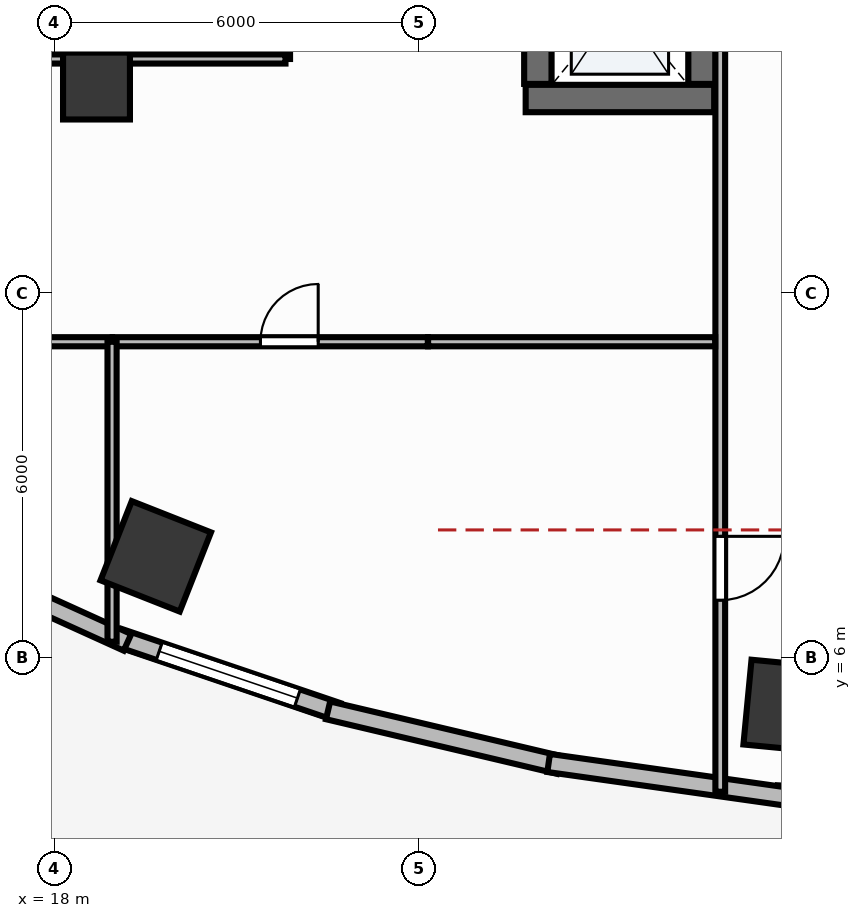
"""IFC4 building model, lengths in metres.
Left out: names, types, materials, properties, quantities, classifications, styles, units other than length and angle.
Written with IfcOpenShell. Run it as: python <this file> out.ifc"""

import sys

from ifc_helpers import new_model, si_unit, direction, frame, frame_2d, origin, origin_2d, place, context, subcontext, project, spatial, rectangle, extrude, element, fill, save


model = new_model("IFC4")
c1 = context("Model", 3, precision=1e-05, world=origin(), true_north=direction((0.0, 1.0)))
c2 = subcontext(c1, "Body", "Model", "MODEL_VIEW")
j1 = project(units=[si_unit("LENGTHUNIT", "METRE"), si_unit("PLANEANGLEUNIT", "RADIAN")], contexts=[c1])
p1 = place(None, origin())
s1 = spatial("IfcSite", under=j1, at=p1, CompositionType="ELEMENT")
p2 = place(p1, origin())
s2 = spatial("IfcBuilding", under=s1, at=p2, CompositionType="ELEMENT")
p3 = place(p2, origin())
s3 = spatial("IfcBuildingStorey", under=s2, at=p3, CompositionType="ELEMENT", Elevation=0.0)
p4 = place(p3, frame((25.75, 15.2, 0.0), z_axis=(0.0, 0.0, 1.0), x_axis=(1.0, 0.0, 0.0)))
e1 = element("IfcWall", 1, at=p4, inside=s3, PredefinedType="SHEAR", context=c2, shape_type="SweptSolid", body=[
    extrude(rectangle(XDim=3.1, YDim=0.45, at=frame_2d((1.55, 0.0))), origin(), (0.0, 0.0, 1.0), 5.1),
])
for number, where, z_axis, x_axis in (
    (2, (25.95, 15.44, 0.0), (0.0, 0.0, 1.0), (0.0, 1.0, 0.0)),
    (3, (28.65, 15.44, 0.0), (0.0, 0.0, 1.0), (0.0, 1.0, 0.0)),
):
    element("IfcWall", number, at=place(p3, frame(where, z_axis=z_axis, x_axis=x_axis)), inside=s3, PredefinedType="SHEAR", context=c2, shape_type="SweptSolid", body=[
        extrude(rectangle(XDim=2.7, YDim=0.45, at=frame_2d((1.35, 0.0))), origin(), (0.0, 0.0, 1.0), 5.1),
    ])
p5 = place(p3, frame((18.692, 15.405, -0.0), z_axis=(0.0, 0.0, 1.0), x_axis=(1.0, 0.0, 0.0)))
e4 = element("IfcColumn", 4, at=p5, inside=s3, PredefinedType="COLUMN", context=c2, shape_type="SweptSolid", body=[
    extrude(rectangle(XDim=1.1, YDim=1.1, at=origin_2d()), origin(), (0.0, 0.0, 1.0), 5.101),
])
for number, where, z_axis, x_axis in (
    (5, (19.667, 7.671, -0.0), (0.0, 0.0, 1.0), (-0.93, 0.367, 0.0)),
    (6, (30.094, 5.208, -0.0), (0.0, 0.0, 1.0), (-0.995, 0.095, 0.0)),
):
    element("IfcColumn", number, at=place(p3, frame(where, z_axis=z_axis, x_axis=x_axis)), inside=s3, PredefinedType="COLUMN", context=c2, shape_type="SweptSolid", body=[
        extrude(rectangle(XDim=1.4, YDim=1.4, at=origin_2d()), origin(), (0.0, 0.0, 1.0), 5.101),
    ])
p6 = place(p3, frame((19.065, 6.333, 0.0), z_axis=(0.0, 0.0, 1.0), x_axis=(0.947034337234, -0.321132315564, 0.0)))
e7 = element("IfcWall", 7, at=p6, inside=s3, PredefinedType="STANDARD", context=c2, shape_type="SweptSolid", body=[
    extrude(rectangle(XDim=3.79, YDim=0.3, at=frame_2d((1.895, 0.0))), origin(), (0.0, 0.0, 1.0), 5.1),
])
p7 = place(p6, frame((0.695, 0.0, 1.5)))
e8 = element("IfcOpeningElement", 8, at=p7, cuts=e7, PredefinedType="OPENING", context=c2, shape_type="SweptSolid", body=[
    extrude(rectangle(XDim=2.4, YDim=1.2, at=frame_2d((1.2, 0.6))), frame((0.0, 0.165, 0.0), z_axis=(0.0, -1.0, 0.0), x_axis=(1.0, 0.0, 0.0)), (0.0, 0.0, 1.0), 0.33),
])
p8 = place(p3, frame((33.821, 3.558, 0.0), z_axis=(0.0, 0.0, 1.0), x_axis=(-0.99873153138, 0.050352042933, 0.0)))
e9 = element("IfcWall", 9, at=p8, inside=s3, PredefinedType="STANDARD", context=c2, shape_type="SweptSolid", body=[
    extrude(rectangle(XDim=3.937, YDim=0.3, at=frame_2d((1.969, 0.0))), origin(), (0.0, 0.0, 1.0), 5.1),
])
p9 = place(p8, frame((0.969, 0.0, 0.0)))
e10 = element("IfcOpeningElement", 10, at=p9, cuts=e9, PredefinedType="OPENING", context=c2, shape_type="SweptSolid", body=[
    extrude(rectangle(XDim=2.0, YDim=2.3, at=frame_2d((1.0, 1.15))), frame((0.0, 0.165, 0.0), z_axis=(0.0, -1.0, 0.0), x_axis=(1.0, 0.0, 0.0)), (0.0, 0.0, 1.0), 0.33),
])
p10 = place(p3, frame((15.796, 7.802, 0.0), z_axis=(0.0, 0.0, 1.0), x_axis=(0.910623406862, -0.413237233166, 0.0)))
e11 = element("IfcWall", 11, at=p10, inside=s3, PredefinedType="STANDARD", context=c2, shape_type="SweptSolid", body=[
    extrude(rectangle(XDim=3.74, YDim=0.3, at=frame_2d((1.87, 0.0))), origin(), (0.0, 0.0, 1.0), 5.1),
])
p11 = place(p3, frame((22.5, 5.138, 0.0), z_axis=(0.0, 0.0, 1.0), x_axis=(0.973197600754, -0.229970497863, 0.0)))
e12 = element("IfcWall", 12, at=p11, inside=s3, PredefinedType="STANDARD", context=c2, shape_type="SweptSolid", body=[
    extrude(rectangle(XDim=3.901, YDim=0.3, at=frame_2d((1.951, 0.0))), origin(), (0.0, 0.0, 1.0), 5.1),
])
p12 = place(p3, frame((26.128, 4.273, 0.0), z_axis=(0.0, 0.0, 1.0), x_axis=(0.990165832998, -0.139898617443, 0.0)))
e13 = element("IfcWall", 13, at=p12, inside=s3, PredefinedType="STANDARD", context=c2, shape_type="SweptSolid", body=[
    extrude(rectangle(XDim=3.951, YDim=0.3, at=frame_2d((1.976, 0.0))), origin(), (0.0, 0.0, 1.0), 5.1),
])
p13 = place(p3, frame((28.95, 18.25, 0.0), z_axis=(0.0, 0.0, 1.0), x_axis=(0.0, -1.0, 0.0)))
e14 = element("IfcWall", 14, at=p13, inside=s3, PredefinedType="PARTITIONING", context=c2, shape_type="SweptSolid", body=[
    extrude(rectangle(XDim=14.45, YDim=0.16, at=frame_2d((7.225, 0.0))), origin(), (0.0, 0.0, 1.0), 4.11),
])
p14 = place(p13, frame((10.25, 0.0, 0.0)))
e15 = element("IfcOpeningElement", 15, at=p14, cuts=e14, PredefinedType="OPENING", context=c2, shape_type="SweptSolid", body=[
    extrude(rectangle(XDim=1.05, YDim=2.15, at=frame_2d((0.525, 1.075))), frame((0.0, 0.095, 0.0), z_axis=(0.0, -1.0, 0.0), x_axis=(1.0, 0.0, 0.0)), (0.0, 0.0, 1.0), 0.19),
])
p15 = place(p3, frame((18.958, 11.2, 0.0), z_axis=(0.0, 0.0, 1.0), x_axis=(1.0, 0.0, 0.0)))
e16 = element("IfcWall", 16, at=p15, inside=s3, PredefinedType="PARTITIONING", context=c2, shape_type="SweptSolid", body=[
    extrude(rectangle(XDim=5.183, YDim=0.15, at=frame_2d((2.591, 0.0))), origin(), (0.0, 0.0, 1.0), 4.11),
])
p16 = place(p15, frame((2.43, 0.0, 0.0)))
e17 = element("IfcOpeningElement", 17, at=p16, cuts=e16, PredefinedType="OPENING", context=c2, shape_type="SweptSolid", body=[
    extrude(rectangle(XDim=0.95, YDim=2.15, at=frame_2d((0.475, 1.075))), frame((0.0, 0.09, 0.0), z_axis=(0.0, -1.0, 0.0), x_axis=(1.0, 0.0, 0.0)), (0.0, 0.0, 1.0), 0.18),
])
p17 = place(p3, frame((21.8, 18.45, 0.0), z_axis=(0.0, 0.0, 1.0), x_axis=(0.0, -1.0, 0.0)))
e18 = element("IfcWall", 18, at=p17, inside=s3, PredefinedType="PARTITIONING", context=c2, shape_type="SweptSolid", body=[
    extrude(rectangle(XDim=2.6, YDim=0.15, at=frame_2d((1.3, 0.0))), origin(), (0.0, 0.0, 1.0), 4.11),
])
p18 = place(p3, frame((21.8, 15.85, 0.0), z_axis=(0.0, 0.0, 1.0), x_axis=(-1.0, 0.0, 0.0)))
e19 = element("IfcWall", 19, at=p18, inside=s3, PredefinedType="PARTITIONING", context=c2, shape_type="SweptSolid", body=[
    extrude(rectangle(XDim=2.848, YDim=0.15, at=frame_2d((1.424, 0.0))), origin(), (0.0, 0.0, 1.0), 4.11),
])
p19 = place(p3, frame((18.948, 15.85, 0.0), z_axis=(0.0, 0.0, 1.0), x_axis=(-1.0, 0.0, 0.0)))
e20 = element("IfcWall", 20, at=p19, inside=s3, PredefinedType="PARTITIONING", context=c2, shape_type="SweptSolid", body=[
    extrude(rectangle(XDim=3.304, YDim=0.15, at=frame_2d((1.652, 0.0))), origin(), (0.0, 0.0, 1.0), 4.11),
])
p20 = place(p3, frame((15.523, 11.2, 0.0), z_axis=(0.0, 0.0, 1.0), x_axis=(1.0, 0.0, 0.0)))
e21 = element("IfcWall", 21, at=p20, inside=s3, PredefinedType="PARTITIONING", context=c2, shape_type="SweptSolid", body=[
    extrude(rectangle(XDim=3.425, YDim=0.15, at=frame_2d((1.712, 0.0))), origin(), (0.0, 0.0, 1.0), 4.11),
])
p21 = place(p3, frame((18.948, 11.2, 0.0), z_axis=(0.0, 0.0, 1.0), x_axis=(0.0, -1.0, 0.0)))
e22 = element("IfcWall", 22, at=p21, inside=s3, PredefinedType="PARTITIONING", context=c2, shape_type="SweptSolid", body=[
    extrude(rectangle(XDim=4.933, YDim=0.15, at=frame_2d((2.467, 0.0))), origin(), (0.0, 0.0, 1.0), 4.11),
])
p22 = place(p3, frame((24.145, 11.2, 0.0), z_axis=(0.0, 0.0, 1.0), x_axis=(1.0, 0.0, 0.0)))
e23 = element("IfcWall", 23, at=p22, inside=s3, PredefinedType="PARTITIONING", context=c2, shape_type="SweptSolid", body=[
    extrude(rectangle(XDim=4.721, YDim=0.15, at=frame_2d((2.36, 0.0))), origin(), (0.0, 0.0, 1.0), 4.11),
])
p23 = place(p7, origin())
e24 = element("IfcWindow", 24, at=p23, inside=s3, PartitioningType="DOUBLE_PANEL_HORIZONTAL", PredefinedType="WINDOW", context=c2, shape_type="SweptSolid", body=[
    extrude(rectangle(XDim=2.4, YDim=1.2, at=frame_2d((1.2, 0.6))), frame((0.0, 0.03, 0.0), z_axis=(0.0, -1.0, 0.0), x_axis=(1.0, 0.0, 0.0)), (0.0, 0.0, 1.0), 0.06),
])
fill(e8, e24)
p24 = place(p14, origin())
e25 = element("IfcDoor", 25, at=p24, inside=s3, OperationType="SINGLE_SWING_LEFT", PredefinedType="DOOR", context=c2, shape_type="SweptSolid", body=[
    extrude(rectangle(XDim=1.05, YDim=2.15, at=frame_2d((0.525, 1.075))), frame((0.0, 0.025, 0.0), z_axis=(0.0, -1.0, 0.0), x_axis=(1.0, 0.0, 0.0)), (0.0, 0.0, 1.0), 0.05),
])
fill(e15, e25)
p25 = place(p16, origin())
e26 = element("IfcDoor", 26, at=p25, inside=s3, OperationType="SINGLE_SWING_RIGHT", PredefinedType="DOOR", context=c2, shape_type="SweptSolid", body=[
    extrude(rectangle(XDim=0.95, YDim=2.15, at=frame_2d((0.475, 1.075))), frame((0.0, 0.025, 0.0), z_axis=(0.0, -1.0, 0.0), x_axis=(1.0, 0.0, 0.0)), (0.0, 0.0, 1.0), 0.05),
])
fill(e17, e26)
save(model, sys.argv[1])
